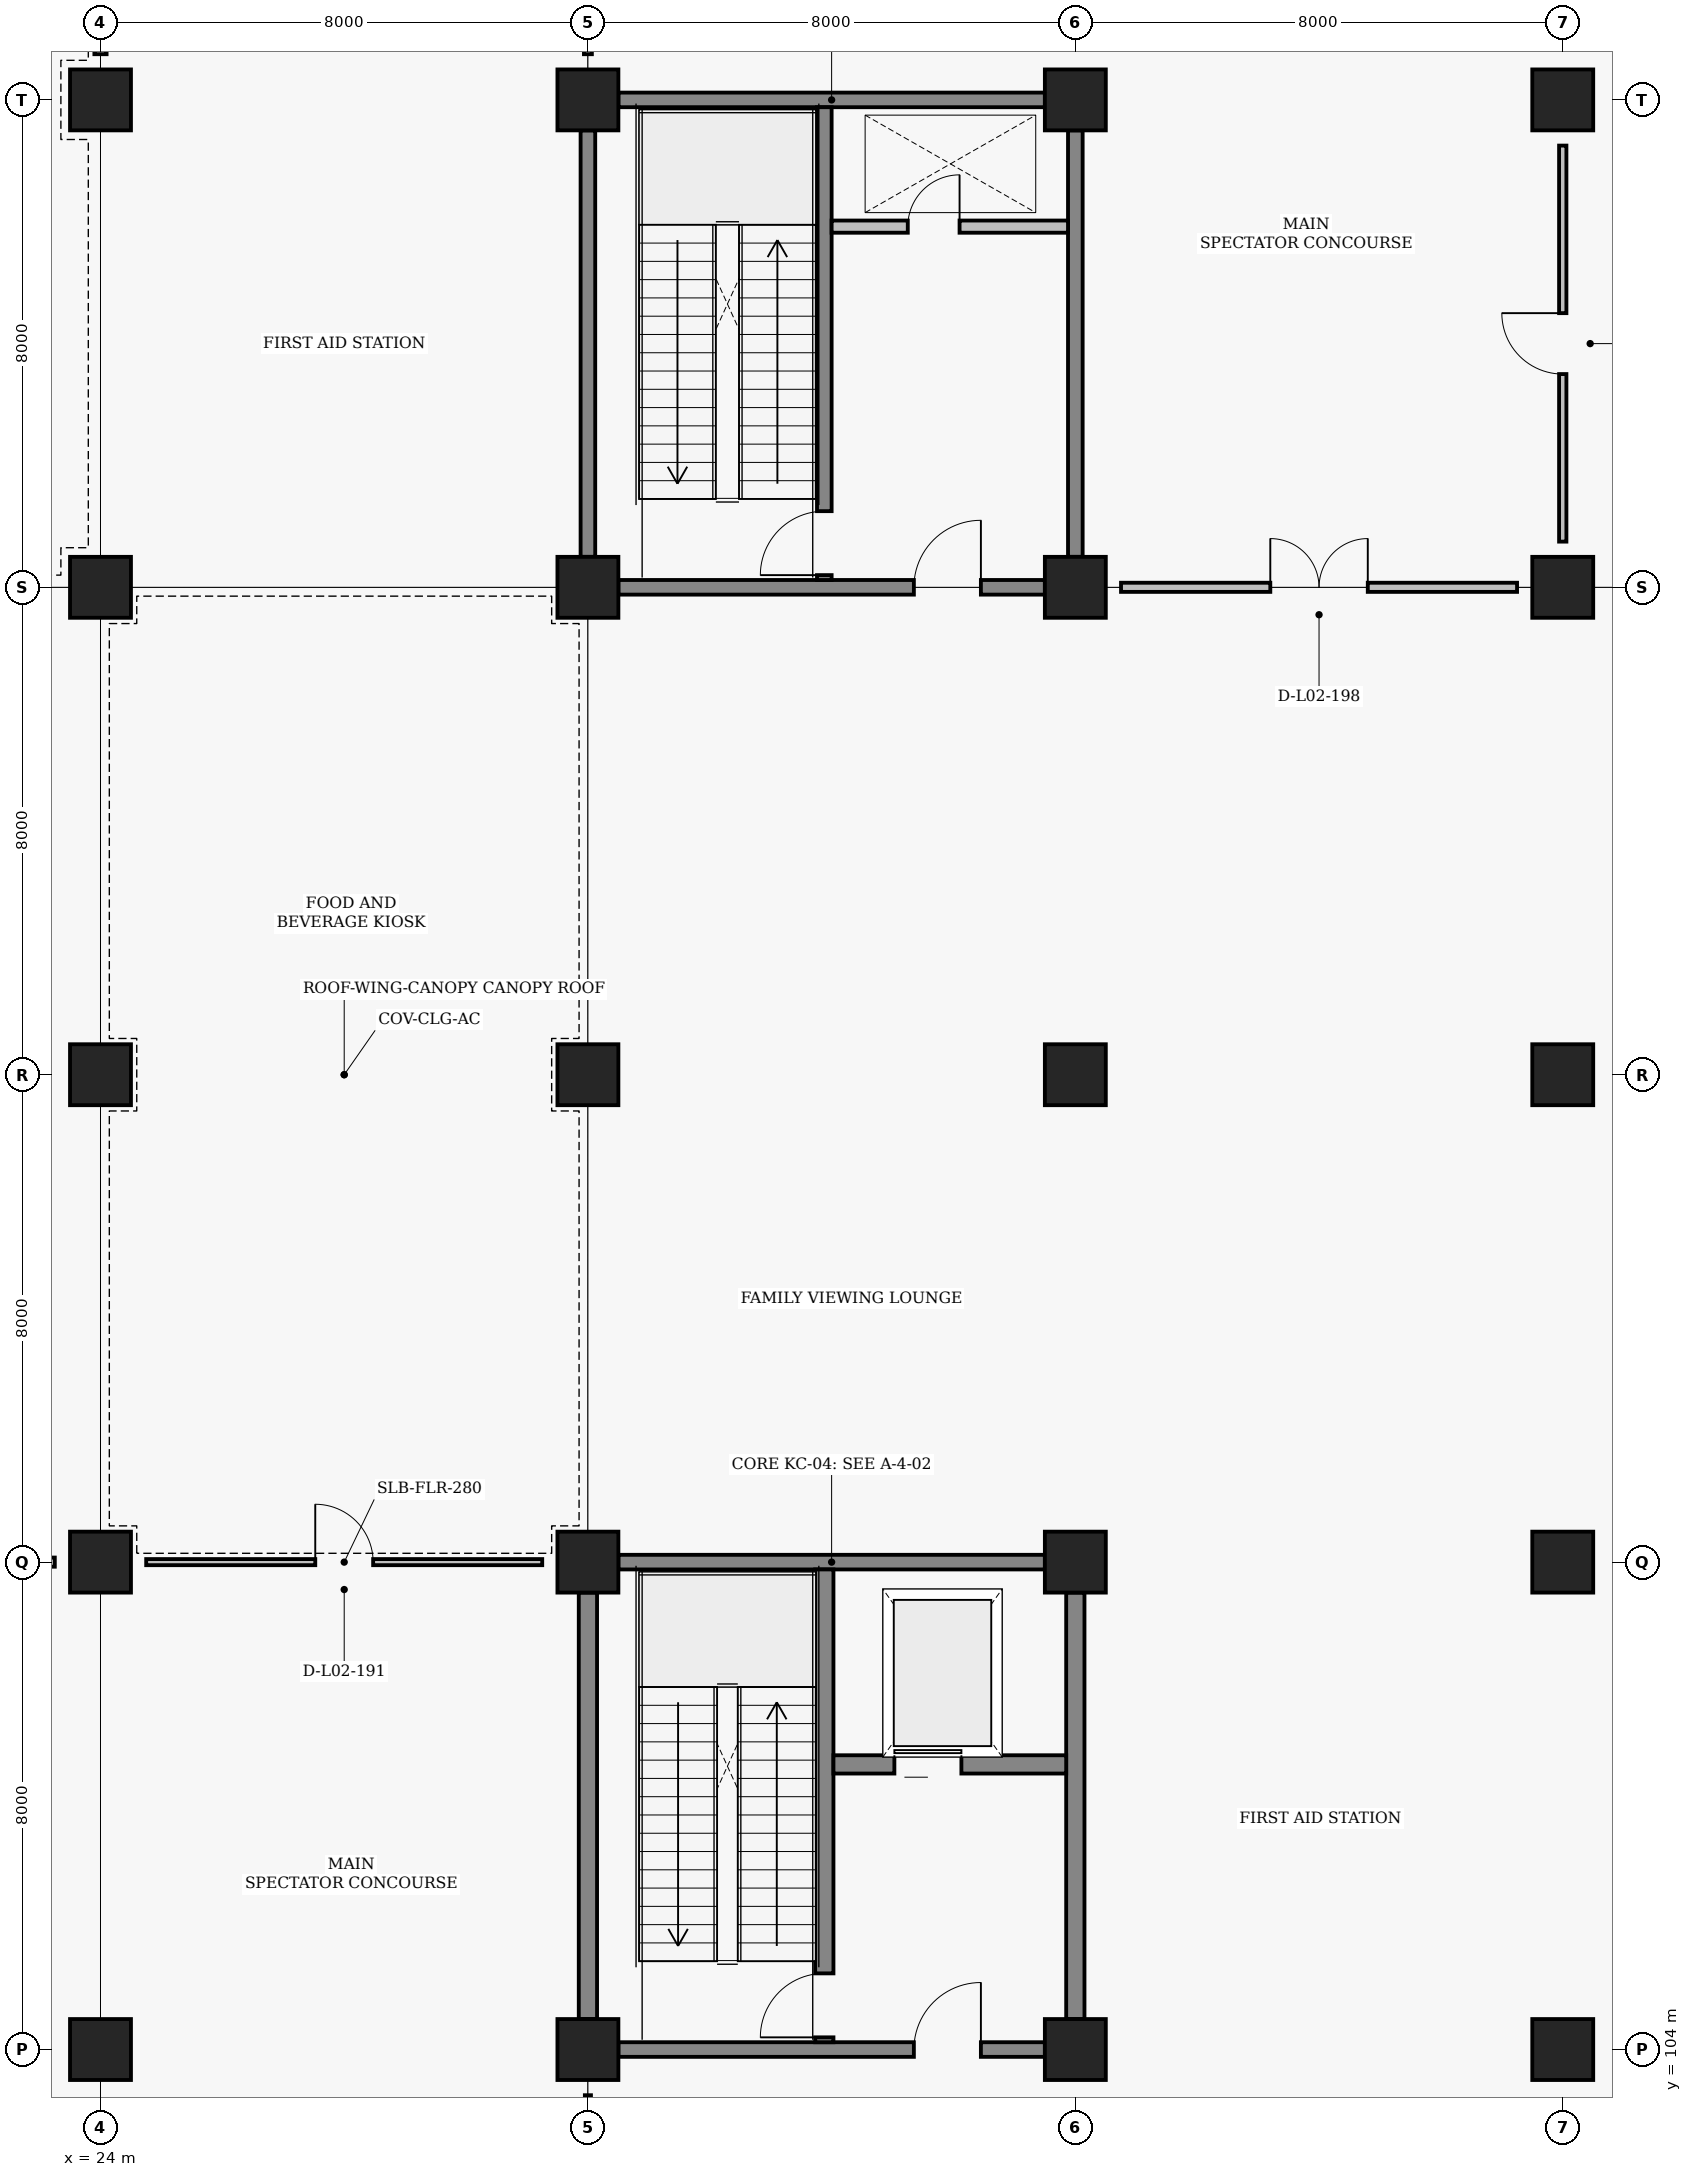
"""IFC4 building model, lengths in metres.
Left out: names, types, materials, properties, quantities, classifications, styles, units other than length and angle.
Written with IfcOpenShell. Run it as: python <this file> out.ifc"""

import sys

from ifc_helpers import new_model, si_unit, direction, frame, frame_2d, origin, origin_2d, place, context, subcontext, project, spatial, rectangle, extrude, element, fill, save


model = new_model("IFC4")
c1 = context("Model", 3, precision=1e-05, world=origin(), true_north=direction((0.0, 1.0)))
c2 = subcontext(c1, "Body", "Model", "MODEL_VIEW")
j1 = project(units=[si_unit("LENGTHUNIT", "METRE"), si_unit("PLANEANGLEUNIT", "RADIAN")], contexts=[c1])
p1 = place(None, origin())
s1 = spatial("IfcSite", under=j1, at=p1, CompositionType="ELEMENT")
p2 = place(p1, origin())
s2 = spatial("IfcBuilding", under=s1, at=p2, CompositionType="ELEMENT")
p3 = place(p2, frame((0.0, 0.0, 4.8)))
s3 = spatial("IfcBuildingStorey", under=s2, at=p3, CompositionType="ELEMENT", Elevation=4.8)
for number, where, z_axis, x_axis in (
    (1, (24.0, 104.0, 0.0), (0.0, 0.0, 1.0), (1.0, 0.0, 0.0)),
    (2, (24.0, 112.0, 0.0), (0.0, 0.0, 1.0), (1.0, 0.0, 0.0)),
    (3, (24.0, 120.0, 0.0), (0.0, 0.0, 1.0), (1.0, 0.0, 0.0)),
    (4, (24.0, 128.0, 0.0), (0.0, 0.0, 1.0), (1.0, 0.0, 0.0)),
    (5, (24.0, 136.0, 0.0), (0.0, 0.0, 1.0), (1.0, 0.0, 0.0)),
    (6, (32.0, 104.0, 0.0), (0.0, 0.0, 1.0), (1.0, 0.0, 0.0)),
    (7, (32.0, 112.0, 0.0), (0.0, 0.0, 1.0), (1.0, 0.0, 0.0)),
    (8, (32.0, 120.0, 0.0), (0.0, 0.0, 1.0), (1.0, 0.0, 0.0)),
    (9, (32.0, 128.0, 0.0), (0.0, 0.0, 1.0), (1.0, 0.0, 0.0)),
    (10, (32.0, 136.0, 0.0), (0.0, 0.0, 1.0), (1.0, 0.0, 0.0)),
    (11, (40.0, 104.0, 0.0), (0.0, 0.0, 1.0), (1.0, 0.0, 0.0)),
    (12, (40.0, 112.0, 0.0), (0.0, 0.0, 1.0), (1.0, 0.0, 0.0)),
    (13, (40.0, 120.0, 0.0), (0.0, 0.0, 1.0), (1.0, 0.0, 0.0)),
    (14, (40.0, 128.0, 0.0), (0.0, 0.0, 1.0), (1.0, 0.0, 0.0)),
    (15, (40.0, 136.0, 0.0), (0.0, 0.0, 1.0), (1.0, 0.0, 0.0)),
    (16, (48.0, 104.0, 0.0), (0.0, 0.0, 1.0), (1.0, 0.0, 0.0)),
    (17, (48.0, 112.0, 0.0), (0.0, 0.0, 1.0), (1.0, 0.0, 0.0)),
    (18, (48.0, 120.0, 0.0), (0.0, 0.0, 1.0), (1.0, 0.0, 0.0)),
    (19, (48.0, 128.0, 0.0), (0.0, 0.0, 1.0), (1.0, 0.0, 0.0)),
    (20, (48.0, 136.0, 0.0), (0.0, 0.0, 1.0), (1.0, 0.0, 0.0)),
):
    element("IfcColumn", number, at=place(p3, frame(where, z_axis=z_axis, x_axis=x_axis)), inside=s3, PredefinedType="COLUMN", context=c2, shape_type="SweptSolid", body=[
        extrude(rectangle(XDim=1.0, YDim=1.0, at=origin_2d()), origin(), (0.0, 0.0, 1.0), 4.8),
    ])
p4 = place(p3, frame((32.5, 104.0, 0.0), z_axis=(0.0, 0.0, 1.0), x_axis=(1.0, 0.0, 0.0)))
e21 = element("IfcWall", 21, at=p4, inside=s3, PredefinedType="SHEAR", context=c2, shape_type="SweptSolid", body=[
    extrude(rectangle(XDim=7.0, YDim=0.24, at=frame_2d((3.5, 0.0))), origin(), (0.0, 0.0, 1.0), 3.61),
])
p5 = place(p4, frame((4.85, 0.0, 0.0)))
e22 = element("IfcOpeningElement", 22, at=p5, cuts=e21, PredefinedType="OPENING", context=c2, shape_type="SweptSolid", body=[
    extrude(rectangle(XDim=1.1, YDim=2.2, at=frame_2d((0.55, 1.1))), frame((0.0, 0.13, 0.0), z_axis=(0.0, -1.0, 0.0), x_axis=(1.0, 0.0, 0.0)), (0.0, 0.0, 1.0), 0.26),
])
p6 = place(p3, frame((32.5, 112.0, 0.0), z_axis=(0.0, 0.0, 1.0), x_axis=(1.0, 0.0, 0.0)))
e23 = element("IfcWall", 23, at=p6, inside=s3, PredefinedType="SHEAR", context=c2, shape_type="SweptSolid", body=[
    extrude(rectangle(XDim=7.0, YDim=0.24, at=frame_2d((3.5, 0.0))), origin(), (0.0, 0.0, 1.0), 3.91),
])
p7 = place(p3, frame((32.0, 104.5, 0.0), z_axis=(0.0, 0.0, 1.0), x_axis=(0.0, 1.0, 0.0)))
e24 = element("IfcWall", 24, at=p7, inside=s3, PredefinedType="SHEAR", context=c2, shape_type="SweptSolid", body=[
    extrude(rectangle(XDim=7.0, YDim=0.3, at=frame_2d((3.5, 0.0))), origin(), (0.0, 0.0, 1.0), 3.91),
])
p8 = place(p3, frame((40.0, 104.5, 0.0), z_axis=(0.0, 0.0, 1.0), x_axis=(0.0, 1.0, 0.0)))
e25 = element("IfcWall", 25, at=p8, inside=s3, PredefinedType="SHEAR", context=c2, shape_type="SweptSolid", body=[
    extrude(rectangle(XDim=7.0, YDim=0.3, at=frame_2d((3.5, 0.0))), origin(), (0.0, 0.0, 1.0), 3.61),
])
p9 = place(p3, frame((35.88, 104.12, 0.0), z_axis=(0.0, 0.0, 1.0), x_axis=(0.0, 1.0, 0.0)))
e26 = element("IfcWall", 26, at=p9, inside=s3, PredefinedType="SHEAR", context=c2, shape_type="SweptSolid", body=[
    extrude(rectangle(XDim=7.76, YDim=0.3, at=frame_2d((3.88, 0.0))), origin(), (0.0, 0.0, 1.0), 4.01),
])
p10 = place(p9, frame((0.08, 0.0, 0.0)))
e27 = element("IfcOpeningElement", 27, at=p10, cuts=e26, PredefinedType="OPENING", context=c2, shape_type="SweptSolid", body=[
    extrude(rectangle(XDim=1.05, YDim=2.15, at=frame_2d((0.525, 1.075))), frame((0.0, 0.16, 0.0), z_axis=(0.0, -1.0, 0.0), x_axis=(1.0, 0.0, 0.0)), (0.0, 0.0, 1.0), 0.32),
])
p11 = place(p3, frame((36.03, 108.68, 0.0), z_axis=(0.0, 0.0, 1.0), x_axis=(1.0, 0.0, 0.0)))
e28 = element("IfcWall", 28, at=p11, inside=s3, PredefinedType="SHEAR", context=c2, shape_type="SweptSolid", body=[
    extrude(rectangle(XDim=3.82, YDim=0.3, at=frame_2d((1.91, 0.0))), origin(), (0.0, 0.0, 1.0), 3.91),
])
p12 = place(p11, frame((1.0, 0.0, 0.0)))
e29 = element("IfcOpeningElement", 29, at=p12, cuts=e28, PredefinedType="OPENING", context=c2, shape_type="SweptSolid", body=[
    extrude(rectangle(XDim=1.1, YDim=2.15, at=frame_2d((0.55, 1.075))), frame((0.0, 0.16, 0.0), z_axis=(0.0, -1.0, 0.0), x_axis=(1.0, 0.0, 0.0)), (0.0, 0.0, 1.0), 0.32),
])
p13 = place(p3, frame((32.5, 128.0, 0.0), z_axis=(0.0, 0.0, 1.0), x_axis=(1.0, 0.0, 0.0)))
e30 = element("IfcWall", 30, at=p13, inside=s3, PredefinedType="SHEAR", context=c2, shape_type="SweptSolid", body=[
    extrude(rectangle(XDim=7.0, YDim=0.24, at=frame_2d((3.5, 0.0))), origin(), (0.0, 0.0, 1.0), 3.91),
])
p14 = place(p13, frame((4.85, 0.0, 0.0)))
e31 = element("IfcOpeningElement", 31, at=p14, cuts=e30, PredefinedType="OPENING", context=c2, shape_type="SweptSolid", body=[
    extrude(rectangle(XDim=1.1, YDim=2.2, at=frame_2d((0.55, 1.1))), frame((0.0, 0.13, 0.0), z_axis=(0.0, -1.0, 0.0), x_axis=(1.0, 0.0, 0.0)), (0.0, 0.0, 1.0), 0.26),
])
for number, where, z_axis, x_axis in (
    (32, (32.5, 136.0, 0.0), (0.0, 0.0, 1.0), (1.0, 0.0, 0.0)),
    (33, (32.0, 128.5, 0.0), (0.0, 0.0, 1.0), (0.0, 1.0, 0.0)),
    (34, (40.0, 128.5, 0.0), (0.0, 0.0, 1.0), (0.0, 1.0, 0.0)),
):
    element("IfcWall", number, at=place(p3, frame(where, z_axis=z_axis, x_axis=x_axis)), inside=s3, PredefinedType="SHEAR", context=c2, shape_type="SweptSolid", body=[
        extrude(rectangle(XDim=7.0, YDim=0.24, at=frame_2d((3.5, 0.0))), origin(), (0.0, 0.0, 1.0), 3.91),
    ])
p15 = place(p3, frame((35.88, 128.12, 0.0), z_axis=(0.0, 0.0, 1.0), x_axis=(0.0, 1.0, 0.0)))
e35 = element("IfcWall", 35, at=p15, inside=s3, PredefinedType="SHEAR", context=c2, shape_type="SweptSolid", body=[
    extrude(rectangle(XDim=7.76, YDim=0.24, at=frame_2d((3.88, 0.0))), origin(), (0.0, 0.0, 1.0), 4.01),
])
p16 = place(p15, frame((0.08, 0.0, 0.0)))
e36 = element("IfcOpeningElement", 36, at=p16, cuts=e35, PredefinedType="OPENING", context=c2, shape_type="SweptSolid", body=[
    extrude(rectangle(XDim=1.05, YDim=2.15, at=frame_2d((0.525, 1.075))), frame((0.0, 0.13, 0.0), z_axis=(0.0, -1.0, 0.0), x_axis=(1.0, 0.0, 0.0)), (0.0, 0.0, 1.0), 0.26),
])
p17 = place(p3, frame((36.0, 133.92, 0.0), z_axis=(0.0, 0.0, 1.0), x_axis=(1.0, 0.0, 0.0)))
e37 = element("IfcWall", 37, at=p17, inside=s3, PredefinedType="PARTITIONING", context=c2, shape_type="SweptSolid", body=[
    extrude(rectangle(XDim=3.88, YDim=0.2, at=frame_2d((1.94, 0.0))), origin(), (0.0, 0.0, 1.0), 3.91),
])
p18 = place(p17, frame((1.25, 0.0, 0.0)))
e38 = element("IfcOpeningElement", 38, at=p18, cuts=e37, PredefinedType="OPENING", context=c2, shape_type="SweptSolid", body=[
    extrude(rectangle(XDim=0.85, YDim=2.05, at=frame_2d((0.425, 1.025))), frame((0.0, 0.11, 0.0), z_axis=(0.0, -1.0, 0.0), x_axis=(1.0, 0.0, 0.0)), (0.0, 0.0, 1.0), 0.22),
])
p19 = place(p3, frame((24.0, 136.75, 0.0), z_axis=(0.0, 0.0, 1.0), x_axis=(0.0, 1.0, 0.0)))
e39 = element("IfcWall", 39, at=p19, inside=s3, PredefinedType="PARTITIONING", context=c2, shape_type="SweptSolid", body=[
    extrude(rectangle(XDim=6.5, YDim=0.2, at=frame_2d((3.25, 0.0))), origin(), (0.0, 0.0, 1.0), 3.91),
])
p20 = place(p3, frame((24.75, 112.0, 0.0), z_axis=(0.0, 0.0, 1.0), x_axis=(1.0, 0.0, 0.0)))
e40 = element("IfcWall", 40, at=p20, inside=s3, PredefinedType="PARTITIONING", context=c2, shape_type="SweptSolid", body=[
    extrude(rectangle(XDim=6.5, YDim=0.1, at=frame_2d((3.25, 0.0))), origin(), (0.0, 0.0, 1.0), 3.91),
])
p21 = place(p20, frame((2.775, 0.0, 0.0)))
e41 = element("IfcOpeningElement", 41, at=p21, cuts=e40, PredefinedType="OPENING", context=c2, shape_type="SweptSolid", body=[
    extrude(rectangle(XDim=0.95, YDim=2.1, at=frame_2d((0.475, 1.05))), frame((0.0, 0.06, 0.0), z_axis=(0.0, -1.0, 0.0), x_axis=(1.0, 0.0, 0.0)), (0.0, 0.0, 1.0), 0.12),
])
p22 = place(p3, frame((32.0, 136.75, 0.0), z_axis=(0.0, 0.0, 1.0), x_axis=(0.0, 1.0, 0.0)))
e42 = element("IfcWall", 42, at=p22, inside=s3, PredefinedType="PARTITIONING", context=c2, shape_type="SweptSolid", body=[
    extrude(rectangle(XDim=6.5, YDim=0.13, at=frame_2d((3.25, 0.0))), origin(), (0.0, 0.0, 1.0), 3.91),
])
p23 = place(p22, frame((2.75, 0.0, 0.0)))
e43 = element("IfcOpeningElement", 43, at=p23, cuts=e42, PredefinedType="OPENING", context=c2, shape_type="SweptSolid", body=[
    extrude(rectangle(XDim=1.0, YDim=2.1, at=frame_2d((0.5, 1.05))), frame((0.0, 0.075, 0.0), z_axis=(0.0, -1.0, 0.0), x_axis=(1.0, 0.0, 0.0)), (0.0, 0.0, 1.0), 0.15),
])
p24 = place(p3, frame((32.0, 96.75, 0.0), z_axis=(0.0, 0.0, 1.0), x_axis=(0.0, 1.0, 0.0)))
e44 = element("IfcWall", 44, at=p24, inside=s3, PredefinedType="PARTITIONING", context=c2, shape_type="SweptSolid", body=[
    extrude(rectangle(XDim=6.5, YDim=0.1, at=frame_2d((3.25, 0.0))), origin(), (0.0, 0.0, 1.0), 3.91),
])
p25 = place(p24, frame((2.775, 0.0, 0.0)))
e45 = element("IfcOpeningElement", 45, at=p25, cuts=e44, PredefinedType="OPENING", context=c2, shape_type="SweptSolid", body=[
    extrude(rectangle(XDim=0.95, YDim=2.1, at=frame_2d((0.475, 1.05))), frame((0.0, 0.06, 0.0), z_axis=(0.0, -1.0, 0.0), x_axis=(1.0, 0.0, 0.0)), (0.0, 0.0, 1.0), 0.12),
])
p26 = place(p3, frame((40.75, 128.0, 0.0), z_axis=(0.0, 0.0, 1.0), x_axis=(1.0, 0.0, 0.0)))
e46 = element("IfcWall", 46, at=p26, inside=s3, PredefinedType="PARTITIONING", context=c2, shape_type="SweptSolid", body=[
    extrude(rectangle(XDim=6.5, YDim=0.15, at=frame_2d((3.25, 0.0))), origin(), (0.0, 0.0, 1.0), 3.91),
])
p27 = place(p26, frame((2.45, 0.0, 0.0)))
e47 = element("IfcOpeningElement", 47, at=p27, cuts=e46, PredefinedType="OPENING", context=c2, shape_type="SweptSolid", body=[
    extrude(rectangle(XDim=1.6, YDim=2.2, at=frame_2d((0.8, 1.1))), frame((0.0, 0.085, 0.0), z_axis=(0.0, -1.0, 0.0), x_axis=(1.0, 0.0, 0.0)), (0.0, 0.0, 1.0), 0.17),
])
p28 = place(p3, frame((48.0, 128.75, 0.0), z_axis=(0.0, 0.0, 1.0), x_axis=(0.0, 1.0, 0.0)))
e48 = element("IfcWall", 48, at=p28, inside=s3, PredefinedType="PARTITIONING", context=c2, shape_type="SweptSolid", body=[
    extrude(rectangle(XDim=6.5, YDim=0.12, at=frame_2d((3.25, 0.0))), origin(), (0.0, 0.0, 1.0), 3.91),
])
p29 = place(p28, frame((2.75, 0.0, 0.0)))
e49 = element("IfcOpeningElement", 49, at=p29, cuts=e48, PredefinedType="OPENING", context=c2, shape_type="SweptSolid", body=[
    extrude(rectangle(XDim=1.0, YDim=2.1, at=frame_2d((0.5, 1.05))), frame((0.0, 0.07, 0.0), z_axis=(0.0, -1.0, 0.0), x_axis=(1.0, 0.0, 0.0)), (0.0, 0.0, 1.0), 0.14),
])
p30 = place(p3, frame((16.75, 112.0, 0.0), z_axis=(0.0, 0.0, 1.0), x_axis=(1.0, 0.0, 0.0)))
e50 = element("IfcWall", 50, at=p30, inside=s3, PredefinedType="PARTITIONING", context=c2, shape_type="SweptSolid", body=[
    extrude(rectangle(XDim=6.5, YDim=0.15, at=frame_2d((3.25, 0.0))), origin(), (0.0, 0.0, 1.0), 3.91),
])
p31 = place(p30, frame((2.725, 0.0, 0.0)))
e51 = element("IfcOpeningElement", 51, at=p31, cuts=e50, PredefinedType="OPENING", context=c2, shape_type="SweptSolid", body=[
    extrude(rectangle(XDim=1.05, YDim=2.15, at=frame_2d((0.525, 1.075))), frame((0.0, 0.085, 0.0), z_axis=(0.0, -1.0, 0.0), x_axis=(1.0, 0.0, 0.0)), (0.0, 0.0, 1.0), 0.17),
])
p32 = place(p5, origin())
e52 = element("IfcDoor", 52, at=p32, inside=s3, OperationType="SINGLE_SWING_RIGHT", PredefinedType="DOOR", context=c2, shape_type="SweptSolid", body=[
    extrude(rectangle(XDim=1.1, YDim=2.2, at=frame_2d((0.55, 1.1))), frame((0.0, 0.025, 0.0), z_axis=(0.0, -1.0, 0.0), x_axis=(1.0, 0.0, 0.0)), (0.0, 0.0, 1.0), 0.05),
])
fill(e22, e52)
p33 = place(p10, origin())
e53 = element("IfcDoor", 53, at=p33, inside=s3, OperationType="SINGLE_SWING_LEFT", PredefinedType="DOOR", context=c2, shape_type="SweptSolid", body=[
    extrude(rectangle(XDim=1.05, YDim=2.15, at=frame_2d((0.525, 1.075))), frame((0.0, 0.025, 0.0), z_axis=(0.0, -1.0, 0.0), x_axis=(1.0, 0.0, 0.0)), (0.0, 0.0, 1.0), 0.05),
])
fill(e27, e53)
p34 = place(p12, origin())
e54 = element("IfcDoor", 54, at=p34, inside=s3, OperationType="SLIDING_TO_LEFT", PredefinedType="DOOR", context=c2, shape_type="SweptSolid", body=[
    extrude(rectangle(XDim=1.1, YDim=2.15, at=frame_2d((0.55, 1.075))), frame((0.0, 0.025, 0.0), z_axis=(0.0, -1.0, 0.0), x_axis=(1.0, 0.0, 0.0)), (0.0, 0.0, 1.0), 0.05),
])
fill(e29, e54)
p35 = place(p14, origin())
e55 = element("IfcDoor", 55, at=p35, inside=s3, OperationType="SINGLE_SWING_RIGHT", PredefinedType="DOOR", context=c2, shape_type="SweptSolid", body=[
    extrude(rectangle(XDim=1.1, YDim=2.2, at=frame_2d((0.55, 1.1))), frame((0.0, 0.025, 0.0), z_axis=(0.0, -1.0, 0.0), x_axis=(1.0, 0.0, 0.0)), (0.0, 0.0, 1.0), 0.05),
])
fill(e31, e55)
p36 = place(p16, origin())
e56 = element("IfcDoor", 56, at=p36, inside=s3, OperationType="SINGLE_SWING_LEFT", PredefinedType="DOOR", context=c2, shape_type="SweptSolid", body=[
    extrude(rectangle(XDim=1.05, YDim=2.15, at=frame_2d((0.525, 1.075))), frame((0.0, 0.025, 0.0), z_axis=(0.0, -1.0, 0.0), x_axis=(1.0, 0.0, 0.0)), (0.0, 0.0, 1.0), 0.05),
])
fill(e36, e56)
p37 = place(p18, origin())
e57 = element("IfcDoor", 57, at=p37, inside=s3, OperationType="SINGLE_SWING_RIGHT", PredefinedType="TRAPDOOR", context=c2, shape_type="SweptSolid", body=[
    extrude(rectangle(XDim=0.85, YDim=2.05, at=frame_2d((0.425, 1.025))), frame((0.0, 0.025, 0.0), z_axis=(0.0, -1.0, 0.0), x_axis=(1.0, 0.0, 0.0)), (0.0, 0.0, 1.0), 0.05),
])
fill(e38, e57)
p38 = place(p21, origin())
e58 = element("IfcDoor", 58, at=p38, inside=s3, OperationType="SINGLE_SWING_LEFT", PredefinedType="DOOR", context=c2, shape_type="SweptSolid", body=[
    extrude(rectangle(XDim=0.95, YDim=2.1, at=frame_2d((0.475, 1.05))), frame((0.0, 0.025, 0.0), z_axis=(0.0, -1.0, 0.0), x_axis=(1.0, 0.0, 0.0)), (0.0, 0.0, 1.0), 0.05),
])
fill(e41, e58)
p39 = place(p27, origin())
e59 = element("IfcDoor", 59, at=p39, inside=s3, OperationType="DOUBLE_SWING_LEFT", PredefinedType="DOOR", context=c2, shape_type="SweptSolid", body=[
    extrude(rectangle(XDim=1.6, YDim=2.2, at=frame_2d((0.8, 1.1))), frame((0.0, 0.025, 0.0), z_axis=(0.0, -1.0, 0.0), x_axis=(1.0, 0.0, 0.0)), (0.0, 0.0, 1.0), 0.05),
])
fill(e47, e59)
p40 = place(p29, origin())
e60 = element("IfcDoor", 60, at=p40, inside=s3, OperationType="SINGLE_SWING_RIGHT", PredefinedType="DOOR", context=c2, shape_type="SweptSolid", body=[
    extrude(rectangle(XDim=1.0, YDim=2.1, at=frame_2d((0.5, 1.05))), frame((0.0, 0.025, 0.0), z_axis=(0.0, -1.0, 0.0), x_axis=(1.0, 0.0, 0.0)), (0.0, 0.0, 1.0), 0.05),
])
fill(e49, e60)
save(model, sys.argv[1])
